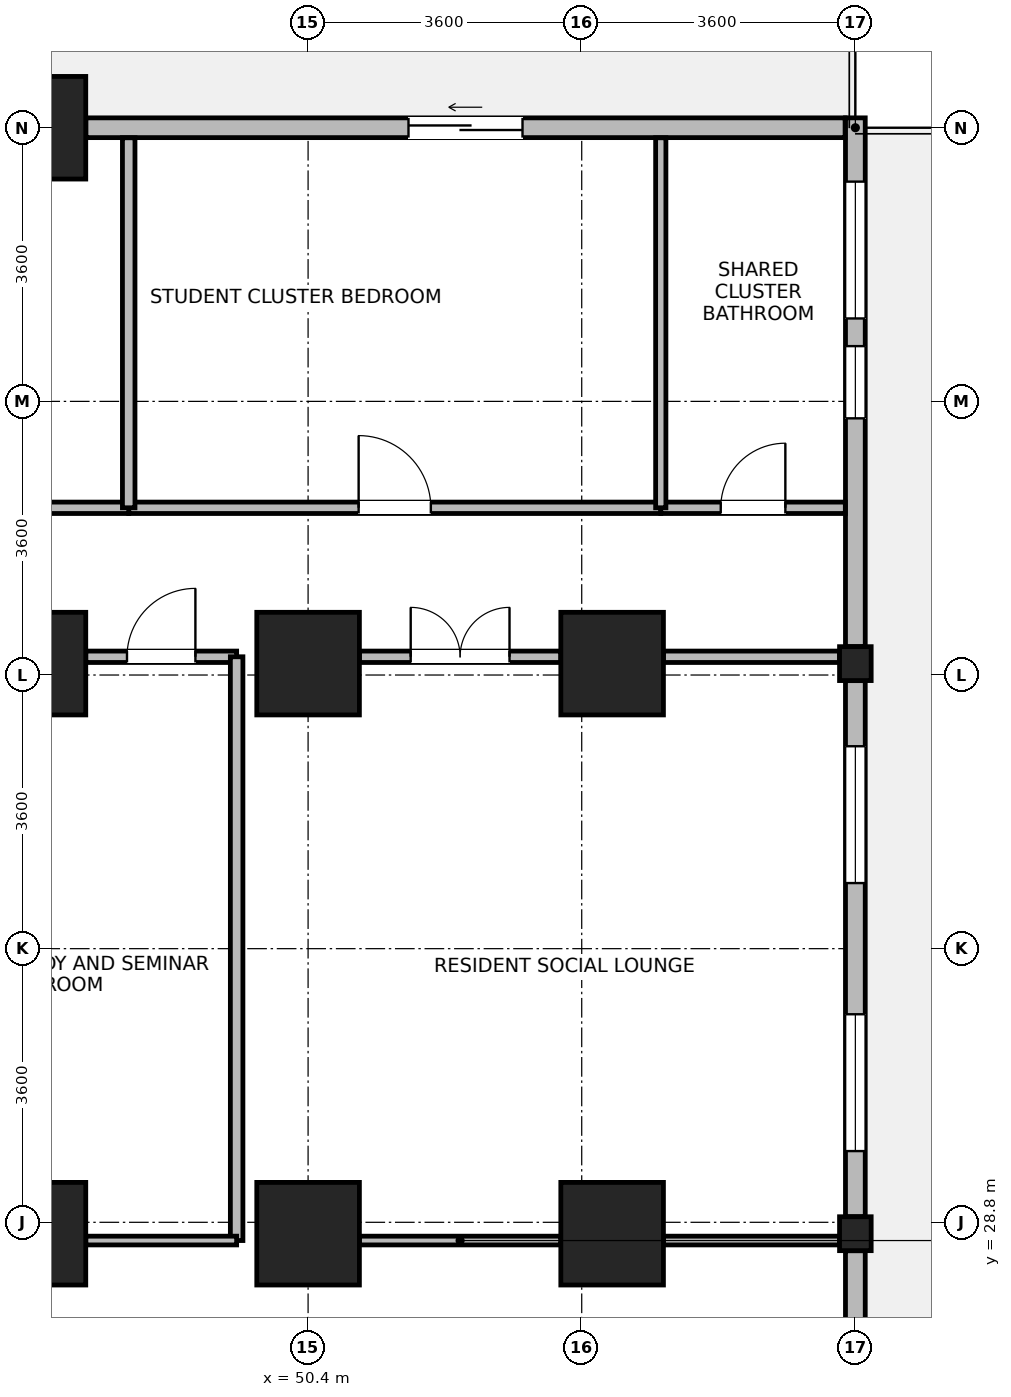
"""IFC4 building model, lengths in metres.
Left out: names, types, materials, properties, quantities, classifications, styles, units other than length and angle.
Written with IfcOpenShell. Run it as: python <this file> out.ifc"""

import sys

from ifc_helpers import new_model, si_unit, direction, frame, frame_2d, origin, origin_2d, place, context, subcontext, project, spatial, rectangle, i_section, extrude, source, transform, mapped, element, fill, save


model = new_model("IFC4")
c1 = context("Model", 3, precision=1e-05, world=origin(), true_north=direction((0.0, 1.0)))
c2 = subcontext(c1, "Body", "Model", "MODEL_VIEW")
j1 = project(units=[si_unit("LENGTHUNIT", "METRE"), si_unit("PLANEANGLEUNIT", "RADIAN")], contexts=[c1])
p1 = place(None, origin())
s1 = spatial("IfcSite", under=j1, at=p1, CompositionType="ELEMENT")
p2 = place(p1, origin())
s2 = spatial("IfcBuilding", under=s1, at=p2, CompositionType="ELEMENT")
p3 = place(p2, frame((0.0, 0.0, 47.5)))
s3 = spatial("IfcBuildingStorey", under=s2, at=p3, CompositionType="ELEMENT", Elevation=47.5)
m1 = source(origin(), c2, "Body", "SweptSolid", [
    extrude(rectangle(XDim=1.35, YDim=1.35, at=origin_2d()), origin(), (0.0, 0.0, 1.0), 3.7),
])
for number, where, z_axis, x_axis in (
    (1, (46.8, 28.65, 0.0), (0.0, 0.0, 1.0), (1.0, 0.0, 0.0)),
    (2, (46.8, 36.15, 0.0), (0.0, 0.0, 1.0), (1.0, 0.0, 0.0)),
    (3, (46.8, 43.2, 0.0), (0.0, 0.0, 1.0), (1.0, 0.0, 0.0)),
    (4, (50.4, 28.65, 0.0), (0.0, 0.0, 1.0), (1.0, 0.0, 0.0)),
    (5, (50.4, 36.15, 0.0), (0.0, 0.0, 1.0), (1.0, 0.0, 0.0)),
    (6, (54.4, 28.65, 0.0), (0.0, 0.0, 1.0), (1.0, 0.0, 0.0)),
    (7, (54.4, 36.15, 0.0), (0.0, 0.0, 1.0), (1.0, 0.0, 0.0)),
):
    element("IfcColumn", number, at=place(p3, frame(where, z_axis=z_axis, x_axis=x_axis)), inside=s3, PredefinedType="COLUMN", context=c2, shape_type="MappedRepresentation", body=[
        mapped(m1, transform((0.0, 0.0, 0.0), x_axis=(1.0, 0.0, 0.0), y_axis=(0.0, 1.0, 0.0), z_axis=(0.0, 0.0, 1.0), scale=1.0)),
    ])
m2 = source(origin(), c2, "Body", "SweptSolid", [
    extrude(i_section(OverallWidth=0.416, OverallDepth=0.446, WebThickness=0.029, FlangeThickness=0.04, FilletRadius=0.015, at=origin_2d()), origin(), (0.0, 0.0, 1.0), 3.7),
])
for number, where, z_axis, x_axis in (
    (8, (57.6, 28.65, 0.0), (0.0, 0.0, 1.0), (1.0, 0.0, 0.0)),
    (9, (57.6, 36.15, 0.0), (0.0, 0.0, 1.0), (1.0, 0.0, 0.0)),
):
    element("IfcColumn", number, at=place(p3, frame(where, z_axis=z_axis, x_axis=x_axis)), inside=s3, PredefinedType="COLUMN", context=c2, shape_type="MappedRepresentation", body=[
        mapped(m2, transform((0.0, 0.0, 0.0), x_axis=(1.0, 0.0, 0.0), y_axis=(0.0, 1.0, 0.0), z_axis=(0.0, 0.0, 1.0), scale=1.0)),
    ])
p4 = place(p3, frame((57.6, 28.426, 0.0), z_axis=(0.0, 0.0, 1.0), x_axis=(0.0, -1.0, 0.0)))
e10 = element("IfcWall", 10, at=p4, inside=s3, PredefinedType="STANDARD", context=c2, shape_type="SweptSolid", body=[
    extrude(rectangle(XDim=6.602, YDim=0.26, at=frame_2d((3.301, 0.0))), origin(), (0.0, 0.0, 1.0), 2.93),
])
p5 = place(p4, frame((4.052, 0.0, 0.85)))
e11 = element("IfcOpeningElement", 11, at=p5, cuts=e10, PredefinedType="OPENING", context=c2, shape_type="SweptSolid", body=[
    extrude(rectangle(XDim=1.8, YDim=1.85, at=frame_2d((0.9, 0.925))), frame((0.0, 0.14, 0.0), z_axis=(0.0, -1.0, 0.0), x_axis=(1.0, 0.0, 0.0)), (0.0, 0.0, 1.0), 0.28),
])
p6 = place(p4, frame((2.298, 0.0, 0.85)))
e12 = element("IfcOpeningElement", 12, at=p6, cuts=e10, PredefinedType="OPENING", context=c2, shape_type="SweptSolid", body=[
    extrude(rectangle(XDim=0.95, YDim=1.75, at=frame_2d((0.475, 0.875))), frame((0.0, 0.14, 0.0), z_axis=(0.0, -1.0, 0.0), x_axis=(1.0, 0.0, 0.0)), (0.0, 0.0, 1.0), 0.28),
])
p7 = place(p3, frame((57.6, 35.926, 0.0), z_axis=(0.0, 0.0, 1.0), x_axis=(0.0, -1.0, 0.0)))
e13 = element("IfcWall", 13, at=p7, inside=s3, PredefinedType="STANDARD", context=c2, shape_type="SweptSolid", body=[
    extrude(rectangle(XDim=7.052, YDim=0.26, at=frame_2d((3.526, 0.0))), origin(), (0.0, 0.0, 1.0), 2.93),
])
p8 = place(p7, frame((0.863, 0.0, 0.85)))
e14 = element("IfcOpeningElement", 14, at=p8, cuts=e13, PredefinedType="OPENING", context=c2, shape_type="SweptSolid", body=[
    extrude(rectangle(XDim=1.8, YDim=1.85, at=frame_2d((0.9, 0.925))), frame((0.0, 0.14, 0.0), z_axis=(0.0, -1.0, 0.0), x_axis=(1.0, 0.0, 0.0)), (0.0, 0.0, 1.0), 0.28),
])
p9 = place(p7, frame((4.389, 0.0, 0.85)))
e15 = element("IfcOpeningElement", 15, at=p9, cuts=e13, PredefinedType="OPENING", context=c2, shape_type="SweptSolid", body=[
    extrude(rectangle(XDim=1.8, YDim=1.85, at=frame_2d((0.9, 0.925))), frame((0.0, 0.14, 0.0), z_axis=(0.0, -1.0, 0.0), x_axis=(1.0, 0.0, 0.0)), (0.0, 0.0, 1.0), 0.28),
])
p10 = place(p3, frame((57.6, 43.33, 0.0), z_axis=(0.0, 0.0, 1.0), x_axis=(0.0, -1.0, 0.0)))
e16 = element("IfcWall", 16, at=p10, inside=s3, PredefinedType="STANDARD", context=c2, shape_type="SweptSolid", body=[
    extrude(rectangle(XDim=6.956, YDim=0.26, at=frame_2d((3.478, 0.0))), origin(), (0.0, 0.0, 1.0), 3.43),
])
p11 = place(p10, frame((0.839, 0.0, 0.85)))
e17 = element("IfcOpeningElement", 17, at=p11, cuts=e16, PredefinedType="OPENING", context=c2, shape_type="SweptSolid", body=[
    extrude(rectangle(XDim=1.8, YDim=1.85, at=frame_2d((0.9, 0.925))), frame((0.0, 0.14, 0.0), z_axis=(0.0, -1.0, 0.0), x_axis=(1.0, 0.0, 0.0)), (0.0, 0.0, 1.0), 0.28),
])
p12 = place(p10, frame((3.003, 0.0, 0.85)))
e18 = element("IfcOpeningElement", 18, at=p12, cuts=e16, PredefinedType="OPENING", context=c2, shape_type="SweptSolid", body=[
    extrude(rectangle(XDim=0.95, YDim=1.75, at=frame_2d((0.475, 0.875))), frame((0.0, 0.14, 0.0), z_axis=(0.0, -1.0, 0.0), x_axis=(1.0, 0.0, 0.0)), (0.0, 0.0, 1.0), 0.28),
])
p13 = place(p3, frame((47.476, 43.2, 0.0), z_axis=(0.0, 0.0, 1.0), x_axis=(1.0, 0.0, 0.0)))
e19 = element("IfcWall", 19, at=p13, inside=s3, PredefinedType="STANDARD", context=c2, shape_type="SweptSolid", body=[
    extrude(rectangle(XDim=9.989, YDim=0.26, at=frame_2d((4.995, 0.0))), origin(), (0.0, 0.0, 1.0), 3.43),
])
p14 = place(p13, frame((4.245, 0.0, 0.0)))
e20 = element("IfcOpeningElement", 20, at=p14, cuts=e19, PredefinedType="OPENING", context=c2, shape_type="SweptSolid", body=[
    extrude(rectangle(XDim=1.5, YDim=2.15, at=frame_2d((0.75, 1.075))), frame((0.0, 0.14, 0.0), z_axis=(0.0, -1.0, 0.0), x_axis=(1.0, 0.0, 0.0)), (0.0, 0.0, 1.0), 0.28),
])
p15 = place(p3, frame((51.075, 36.24, 0.0), z_axis=(0.0, 0.0, 1.0), x_axis=(1.0, 0.0, 0.0)))
e21 = element("IfcWall", 21, at=p15, inside=s3, PredefinedType="PARTITIONING", context=c2, shape_type="SweptSolid", body=[
    extrude(rectangle(XDim=2.65, YDim=0.15, at=frame_2d((1.325, 0.0))), origin(), (0.0, 0.0, 1.0), 2.78),
])
p16 = place(p15, frame((0.675, 0.0, 0.0)))
e22 = element("IfcOpeningElement", 22, at=p16, cuts=e21, PredefinedType="OPENING", context=c2, shape_type="SweptSolid", body=[
    extrude(rectangle(XDim=1.3, YDim=2.12, at=frame_2d((0.65, 1.06))), frame((0.0, 0.085, 0.0), z_axis=(0.0, -1.0, 0.0), x_axis=(1.0, 0.0, 0.0)), (0.0, 0.0, 1.0), 0.17),
])
p17 = place(p3, frame((55.075, 36.24, 0.0), z_axis=(0.0, 0.0, 1.0), x_axis=(1.0, 0.0, 0.0)))
e23 = element("IfcWall", 23, at=p17, inside=s3, PredefinedType="PARTITIONING", context=c2, shape_type="SweptSolid", body=[
    extrude(rectangle(XDim=2.317, YDim=0.15, at=frame_2d((1.159, 0.0))), origin(), (0.0, 0.0, 1.0), 2.78),
])
p18 = place(p3, frame((48.04, 38.2, 0.0), z_axis=(0.0, 0.0, 1.0), x_axis=(1.0, 0.0, 0.0)))
e24 = element("IfcWall", 24, at=p18, inside=s3, PredefinedType="PARTITIONING", context=c2, shape_type="SweptSolid", body=[
    extrude(rectangle(XDim=7.0, YDim=0.15, at=frame_2d((3.5, 0.0))), origin(), (0.0, 0.0, 1.0), 3.43),
])
p19 = place(p18, frame((3.025, 0.0, 0.0)))
e25 = element("IfcOpeningElement", 25, at=p19, cuts=e24, PredefinedType="OPENING", context=c2, shape_type="SweptSolid", body=[
    extrude(rectangle(XDim=0.95, YDim=2.1, at=frame_2d((0.475, 1.05))), frame((0.0, 0.085, 0.0), z_axis=(0.0, -1.0, 0.0), x_axis=(1.0, 0.0, 0.0)), (0.0, 0.0, 1.0), 0.17),
])
p20 = place(p3, frame((41.42, 38.2, 0.0), z_axis=(0.0, 0.0, 1.0), x_axis=(1.0, 0.0, 0.0)))
e26 = element("IfcWall", 26, at=p20, inside=s3, PredefinedType="PARTITIONING", context=c2, shape_type="SweptSolid", body=[
    extrude(rectangle(XDim=6.62, YDim=0.15, at=frame_2d((3.31, 0.0))), origin(), (0.0, 0.0, 1.0), 3.43),
])
p21 = place(p20, frame((2.835, 0.0, 0.0)))
e27 = element("IfcOpeningElement", 27, at=p21, cuts=e26, PredefinedType="OPENING", context=c2, shape_type="SweptSolid", body=[
    extrude(rectangle(XDim=0.95, YDim=2.1, at=frame_2d((0.475, 1.05))), frame((0.0, 0.085, 0.0), z_axis=(0.0, -1.0, 0.0), x_axis=(1.0, 0.0, 0.0)), (0.0, 0.0, 1.0), 0.17),
])
p22 = place(p3, frame((47.475, 36.24, 0.0), z_axis=(0.0, 0.0, 1.0), x_axis=(1.0, 0.0, 0.0)))
e28 = element("IfcWall", 28, at=p22, inside=s3, PredefinedType="PARTITIONING", context=c2, shape_type="SweptSolid", body=[
    extrude(rectangle(XDim=1.985, YDim=0.15, at=frame_2d((0.992, 0.0))), origin(), (0.0, 0.0, 1.0), 2.78),
])
p23 = place(p22, frame((0.542, 0.0, 0.0)))
e29 = element("IfcOpeningElement", 29, at=p23, cuts=e28, PredefinedType="OPENING", context=c2, shape_type="SweptSolid", body=[
    extrude(rectangle(XDim=0.9, YDim=2.08, at=frame_2d((0.45, 1.04))), frame((0.0, 0.085, 0.0), z_axis=(0.0, -1.0, 0.0), x_axis=(1.0, 0.0, 0.0)), (0.0, 0.0, 1.0), 0.17),
])
p24 = place(p3, frame((55.04, 38.2, 0.0), z_axis=(0.0, 0.0, 1.0), x_axis=(1.0, 0.0, 0.0)))
e30 = element("IfcWall", 30, at=p24, inside=s3, PredefinedType="PARTITIONING", context=c2, shape_type="SweptSolid", body=[
    extrude(rectangle(XDim=2.428, YDim=0.15, at=frame_2d((1.214, 0.0))), origin(), (0.0, 0.0, 1.0), 3.43),
])
p25 = place(p24, frame((0.789, 0.0, 0.0)))
e31 = element("IfcOpeningElement", 31, at=p25, cuts=e30, PredefinedType="OPENING", context=c2, shape_type="SweptSolid", body=[
    extrude(rectangle(XDim=0.85, YDim=2.04, at=frame_2d((0.425, 1.02))), frame((0.0, 0.085, 0.0), z_axis=(0.0, -1.0, 0.0), x_axis=(1.0, 0.0, 0.0)), (0.0, 0.0, 1.0), 0.17),
])
p26 = place(p3, frame((51.075, 28.56, 0.0), z_axis=(0.0, 0.0, 1.0), x_axis=(1.0, 0.0, 0.0)))
e32 = element("IfcWall", 32, at=p26, inside=s3, PredefinedType="PARTITIONING", context=c2, shape_type="SweptSolid", body=[
    extrude(rectangle(XDim=2.65, YDim=0.115, at=frame_2d((1.325, 0.0))), origin(), (0.0, 0.0, 1.0), 2.78),
])
p27 = place(p3, frame((55.075, 28.56, 0.0), z_axis=(0.0, 0.0, 1.0), x_axis=(1.0, 0.0, 0.0)))
e33 = element("IfcWall", 33, at=p27, inside=s3, PredefinedType="PARTITIONING", context=c2, shape_type="SweptSolid", body=[
    extrude(rectangle(XDim=2.317, YDim=0.115, at=frame_2d((1.159, 0.0))), origin(), (0.0, 0.0, 1.0), 2.78),
])
p28 = place(p3, frame((49.46, 28.56, 0.0), z_axis=(0.0, 0.0, 1.0), x_axis=(0.0, 1.0, 0.0)))
e34 = element("IfcWall", 34, at=p28, inside=s3, PredefinedType="PARTITIONING", context=c2, shape_type="SweptSolid", body=[
    extrude(rectangle(XDim=7.68, YDim=0.165, at=frame_2d((3.84, 0.0))), origin(), (0.0, 0.0, 1.0), 3.43),
])
p29 = place(p3, frame((48.04, 38.2, 0.0), z_axis=(0.0, 0.0, 1.0), x_axis=(0.0, 1.0, 0.0)))
e35 = element("IfcWall", 35, at=p29, inside=s3, PredefinedType="PARTITIONING", context=c2, shape_type="SweptSolid", body=[
    extrude(rectangle(XDim=4.868, YDim=0.165, at=frame_2d((2.434, 0.0))), origin(), (0.0, 0.0, 1.0), 3.43),
])
p30 = place(p3, frame((55.04, 38.2, 0.0), z_axis=(0.0, 0.0, 1.0), x_axis=(0.0, 1.0, 0.0)))
e36 = element("IfcWall", 36, at=p30, inside=s3, PredefinedType="PARTITIONING", context=c2, shape_type="SweptSolid", body=[
    extrude(rectangle(XDim=4.868, YDim=0.135, at=frame_2d((2.434, 0.0))), origin(), (0.0, 0.0, 1.0), 3.43),
])
p31 = place(p3, frame((47.475, 28.56, 0.0), z_axis=(0.0, 0.0, 1.0), x_axis=(1.0, 0.0, 0.0)))
e37 = element("IfcWall", 37, at=p31, inside=s3, PredefinedType="PARTITIONING", context=c2, shape_type="SweptSolid", body=[
    extrude(rectangle(XDim=1.985, YDim=0.115, at=frame_2d((0.992, 0.0))), origin(), (0.0, 0.0, 1.0), 2.78),
])
p32 = place(p8, origin())
e38 = element("IfcWindow", 38, at=p32, inside=s3, PartitioningType="SINGLE_PANEL", PredefinedType="WINDOW", context=c2, shape_type="SweptSolid", body=[
    extrude(rectangle(XDim=1.8, YDim=1.85, at=frame_2d((0.9, 0.925))), frame((0.0, 0.03, 0.0), z_axis=(0.0, -1.0, 0.0), x_axis=(1.0, 0.0, 0.0)), (0.0, 0.0, 1.0), 0.06),
])
fill(e14, e38)
p33 = place(p9, origin())
e39 = element("IfcWindow", 39, at=p33, inside=s3, PartitioningType="SINGLE_PANEL", PredefinedType="WINDOW", context=c2, shape_type="SweptSolid", body=[
    extrude(rectangle(XDim=1.8, YDim=1.85, at=frame_2d((0.9, 0.925))), frame((0.0, 0.03, 0.0), z_axis=(0.0, -1.0, 0.0), x_axis=(1.0, 0.0, 0.0)), (0.0, 0.0, 1.0), 0.06),
])
fill(e15, e39)
p34 = place(p11, origin())
e40 = element("IfcWindow", 40, at=p34, inside=s3, PartitioningType="SINGLE_PANEL", PredefinedType="WINDOW", context=c2, shape_type="SweptSolid", body=[
    extrude(rectangle(XDim=1.8, YDim=1.85, at=frame_2d((0.9, 0.925))), frame((0.0, 0.03, 0.0), z_axis=(0.0, -1.0, 0.0), x_axis=(1.0, 0.0, 0.0)), (0.0, 0.0, 1.0), 0.06),
])
fill(e17, e40)
p35 = place(p12, origin())
e41 = element("IfcWindow", 41, at=p35, inside=s3, PartitioningType="SINGLE_PANEL", PredefinedType="WINDOW", context=c2, shape_type="SweptSolid", body=[
    extrude(rectangle(XDim=0.95, YDim=1.75, at=frame_2d((0.475, 0.875))), frame((0.0, 0.03, 0.0), z_axis=(0.0, -1.0, 0.0), x_axis=(1.0, 0.0, 0.0)), (0.0, 0.0, 1.0), 0.06),
])
fill(e18, e41)
p36 = place(p14, origin())
e42 = element("IfcDoor", 42, at=p36, inside=s3, OperationType="SLIDING_TO_LEFT", PredefinedType="DOOR", context=c2, shape_type="SweptSolid", body=[
    extrude(rectangle(XDim=1.5, YDim=2.15, at=frame_2d((0.75, 1.075))), frame((0.0, 0.025, 0.0), z_axis=(0.0, -1.0, 0.0), x_axis=(1.0, 0.0, 0.0)), (0.0, 0.0, 1.0), 0.05),
])
fill(e20, e42)
p37 = place(p16, origin())
e43 = element("IfcDoor", 43, at=p37, inside=s3, OperationType="DOUBLE_DOOR_SINGLE_SWING", PredefinedType="DOOR", context=c2, shape_type="SweptSolid", body=[
    extrude(rectangle(XDim=1.3, YDim=2.12, at=frame_2d((0.65, 1.06))), frame((0.0, 0.025, 0.0), z_axis=(0.0, -1.0, 0.0), x_axis=(1.0, 0.0, 0.0)), (0.0, 0.0, 1.0), 0.05),
])
fill(e22, e43)
p38 = place(p19, origin())
e44 = element("IfcDoor", 44, at=p38, inside=s3, OperationType="SINGLE_SWING_LEFT", PredefinedType="DOOR", context=c2, shape_type="SweptSolid", body=[
    extrude(rectangle(XDim=0.95, YDim=2.1, at=frame_2d((0.475, 1.05))), frame((0.0, 0.025, 0.0), z_axis=(0.0, -1.0, 0.0), x_axis=(1.0, 0.0, 0.0)), (0.0, 0.0, 1.0), 0.05),
])
fill(e25, e44)
p39 = place(p23, origin())
e45 = element("IfcDoor", 45, at=p39, inside=s3, OperationType="SINGLE_SWING_RIGHT", PredefinedType="DOOR", context=c2, shape_type="SweptSolid", body=[
    extrude(rectangle(XDim=0.9, YDim=2.08, at=frame_2d((0.45, 1.04))), frame((0.0, 0.025, 0.0), z_axis=(0.0, -1.0, 0.0), x_axis=(1.0, 0.0, 0.0)), (0.0, 0.0, 1.0), 0.05),
])
fill(e29, e45)
p40 = place(p25, origin())
e46 = element("IfcDoor", 46, at=p40, inside=s3, OperationType="SINGLE_SWING_RIGHT", PredefinedType="DOOR", context=c2, shape_type="SweptSolid", body=[
    extrude(rectangle(XDim=0.85, YDim=2.04, at=frame_2d((0.425, 1.02))), frame((0.0, 0.025, 0.0), z_axis=(0.0, -1.0, 0.0), x_axis=(1.0, 0.0, 0.0)), (0.0, 0.0, 1.0), 0.05),
])
fill(e31, e46)
save(model, sys.argv[1])
